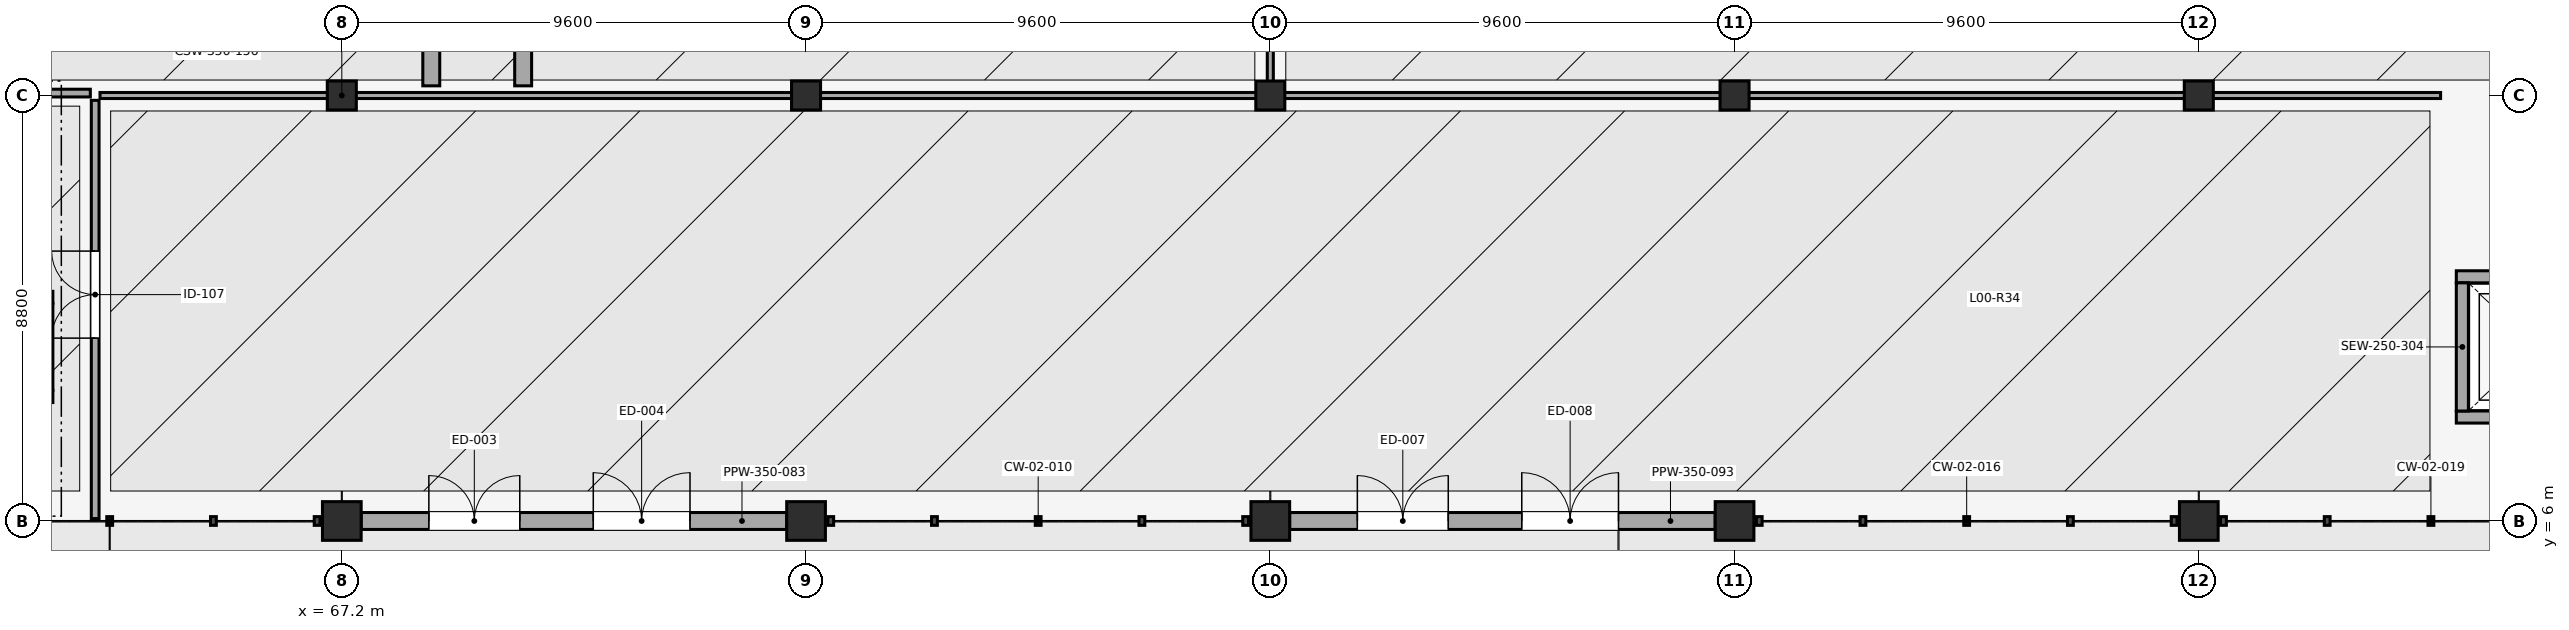
"""IFC4 building model, lengths in metres.
Left out: names, types, materials, properties, quantities, classifications, styles, units other than length and angle.
Written with IfcOpenShell. Run it as: python <this file> out.ifc"""

import sys

from ifc_helpers import new_model, si_unit, direction, frame, frame_2d, origin, origin_2d, place, context, subcontext, project, spatial, rectangle, extrude, element, fill, save


model = new_model("IFC4")
c1 = context("Model", 3, precision=1e-05, world=origin(), true_north=direction((0.0, 1.0)))
c2 = subcontext(c1, "Body", "Model", "MODEL_VIEW")
j1 = project(units=[si_unit("LENGTHUNIT", "METRE"), si_unit("PLANEANGLEUNIT", "RADIAN")], contexts=[c1])
p1 = place(None, origin())
s1 = spatial("IfcSite", under=j1, at=p1, CompositionType="ELEMENT")
p2 = place(p1, origin())
s2 = spatial("IfcBuilding", under=s1, at=p2, CompositionType="ELEMENT")
p3 = place(p2, origin())
s3 = spatial("IfcBuildingStorey", under=s2, at=p3, CompositionType="ELEMENT", Elevation=0.0)
p4 = place(p3, frame((67.2, 6.0, 0.0), z_axis=(0.0, 0.0, 1.0), x_axis=(1.0, 0.0, 0.0)))
e1 = element("IfcColumn", 1, at=p4, inside=s3, PredefinedType="COLUMN", context=c2, shape_type="SweptSolid", body=[
    extrude(rectangle(XDim=0.8, YDim=0.8, at=origin_2d()), origin(), (0.0, 0.0, 1.0), 4.8),
])
p5 = place(p3, frame((67.2, 14.8, 0.0), z_axis=(0.0, 0.0, 1.0), x_axis=(1.0, 0.0, 0.0)))
e2 = element("IfcColumn", 2, at=p5, inside=s3, PredefinedType="COLUMN", context=c2, shape_type="SweptSolid", body=[
    extrude(rectangle(XDim=0.6, YDim=0.6, at=origin_2d()), origin(), (0.0, 0.0, 1.0), 4.8),
])
p6 = place(p3, frame((76.8, 6.0, 0.0), z_axis=(0.0, 0.0, 1.0), x_axis=(1.0, 0.0, 0.0)))
e3 = element("IfcColumn", 3, at=p6, inside=s3, PredefinedType="COLUMN", context=c2, shape_type="SweptSolid", body=[
    extrude(rectangle(XDim=0.8, YDim=0.8, at=origin_2d()), origin(), (0.0, 0.0, 1.0), 4.8),
])
p7 = place(p3, frame((76.8, 14.8, 0.0), z_axis=(0.0, 0.0, 1.0), x_axis=(1.0, 0.0, 0.0)))
e4 = element("IfcColumn", 4, at=p7, inside=s3, PredefinedType="COLUMN", context=c2, shape_type="SweptSolid", body=[
    extrude(rectangle(XDim=0.6, YDim=0.6, at=origin_2d()), origin(), (0.0, 0.0, 1.0), 4.8),
])
p8 = place(p3, frame((86.4, 6.0, 0.0), z_axis=(0.0, 0.0, 1.0), x_axis=(1.0, 0.0, 0.0)))
e5 = element("IfcColumn", 5, at=p8, inside=s3, PredefinedType="COLUMN", context=c2, shape_type="SweptSolid", body=[
    extrude(rectangle(XDim=0.8, YDim=0.8, at=origin_2d()), origin(), (0.0, 0.0, 1.0), 4.8),
])
p9 = place(p3, frame((86.4, 14.8, 0.0), z_axis=(0.0, 0.0, 1.0), x_axis=(1.0, 0.0, 0.0)))
e6 = element("IfcColumn", 6, at=p9, inside=s3, PredefinedType="COLUMN", context=c2, shape_type="SweptSolid", body=[
    extrude(rectangle(XDim=0.6, YDim=0.6, at=origin_2d()), origin(), (0.0, 0.0, 1.0), 4.8),
])
p10 = place(p3, frame((96.0, 6.0, 0.0), z_axis=(0.0, 0.0, 1.0), x_axis=(1.0, 0.0, 0.0)))
e7 = element("IfcColumn", 7, at=p10, inside=s3, PredefinedType="COLUMN", context=c2, shape_type="SweptSolid", body=[
    extrude(rectangle(XDim=0.8, YDim=0.8, at=origin_2d()), origin(), (0.0, 0.0, 1.0), 4.8),
])
p11 = place(p3, frame((96.0, 14.8, 0.0), z_axis=(0.0, 0.0, 1.0), x_axis=(1.0, 0.0, 0.0)))
e8 = element("IfcColumn", 8, at=p11, inside=s3, PredefinedType="COLUMN", context=c2, shape_type="SweptSolid", body=[
    extrude(rectangle(XDim=0.6, YDim=0.6, at=origin_2d()), origin(), (0.0, 0.0, 1.0), 4.8),
])
p12 = place(p3, frame((105.6, 6.0, 0.0), z_axis=(0.0, 0.0, 1.0), x_axis=(1.0, 0.0, 0.0)))
e9 = element("IfcColumn", 9, at=p12, inside=s3, PredefinedType="COLUMN", context=c2, shape_type="SweptSolid", body=[
    extrude(rectangle(XDim=0.8, YDim=0.8, at=origin_2d()), origin(), (0.0, 0.0, 1.0), 4.8),
])
p13 = place(p3, frame((105.6, 14.8, 0.0), z_axis=(0.0, 0.0, 1.0), x_axis=(1.0, 0.0, 0.0)))
e10 = element("IfcColumn", 10, at=p13, inside=s3, PredefinedType="COLUMN", context=c2, shape_type="SweptSolid", body=[
    extrude(rectangle(XDim=0.6, YDim=0.6, at=origin_2d()), origin(), (0.0, 0.0, 1.0), 4.8),
])
p14 = place(p3, frame((67.6, 6.0, 0.0), z_axis=(0.0, 0.0, 1.0), x_axis=(1.0, 0.0, 0.0)))
e11 = element("IfcWall", 11, at=p14, inside=s3, PredefinedType="SOLIDWALL", context=c2, shape_type="SweptSolid", body=[
    extrude(rectangle(XDim=8.8, YDim=0.35, at=frame_2d((4.4, 0.0))), origin(), (0.0, 0.0, 1.0), 4.1),
])
p15 = place(p14, frame((1.4, 0.0, 0.0)))
e12 = element("IfcOpeningElement", 12, at=p15, cuts=e11, PredefinedType="OPENING", context=c2, shape_type="SweptSolid", body=[
    extrude(rectangle(XDim=1.88, YDim=2.31, at=frame_2d((0.94, 1.155))), frame((0.0, 0.185, 0.0), z_axis=(0.0, -1.0, 0.0), x_axis=(1.0, 0.0, 0.0)), (0.0, 0.0, 1.0), 0.37),
])
p16 = place(p14, frame((4.8, 0.0, 0.0)))
e13 = element("IfcOpeningElement", 13, at=p16, cuts=e11, PredefinedType="OPENING", context=c2, shape_type="SweptSolid", body=[
    extrude(rectangle(XDim=2.0, YDim=2.4, at=frame_2d((1.0, 1.2))), frame((0.0, 0.185, 0.0), z_axis=(0.0, -1.0, 0.0), x_axis=(1.0, 0.0, 0.0)), (0.0, 0.0, 1.0), 0.37),
])
p17 = place(p3, frame((86.8, 6.0, 0.0), z_axis=(0.0, 0.0, 1.0), x_axis=(1.0, 0.0, 0.0)))
e14 = element("IfcWall", 14, at=p17, inside=s3, PredefinedType="SOLIDWALL", context=c2, shape_type="SweptSolid", body=[
    extrude(rectangle(XDim=8.8, YDim=0.35, at=frame_2d((4.4, 0.0))), origin(), (0.0, 0.0, 1.0), 4.1),
])
p18 = place(p17, frame((1.4, 0.0, 0.0)))
e15 = element("IfcOpeningElement", 15, at=p18, cuts=e14, PredefinedType="OPENING", context=c2, shape_type="SweptSolid", body=[
    extrude(rectangle(XDim=1.88, YDim=2.31, at=frame_2d((0.94, 1.155))), frame((0.0, 0.185, 0.0), z_axis=(0.0, -1.0, 0.0), x_axis=(1.0, 0.0, 0.0)), (0.0, 0.0, 1.0), 0.37),
])
p19 = place(p17, frame((4.8, 0.0, 0.0)))
e16 = element("IfcOpeningElement", 16, at=p19, cuts=e14, PredefinedType="OPENING", context=c2, shape_type="SweptSolid", body=[
    extrude(rectangle(XDim=2.0, YDim=2.4, at=frame_2d((1.0, 1.2))), frame((0.0, 0.185, 0.0), z_axis=(0.0, -1.0, 0.0), x_axis=(1.0, 0.0, 0.0)), (0.0, 0.0, 1.0), 0.37),
])
for number, where, z_axis, x_axis in (
    (17, (69.05, 15.0, 0.0), (0.0, 0.0, 1.0), (0.0, 1.0, 0.0)),
    (18, (70.95, 15.0, 0.0), (0.0, 0.0, 1.0), (0.0, 1.0, 0.0)),
):
    element("IfcWall", number, at=place(p3, frame(where, z_axis=z_axis, x_axis=x_axis)), inside=s3, PredefinedType="SHEAR", context=c2, shape_type="SweptSolid", body=[
        extrude(rectangle(XDim=3.3, YDim=0.35, at=frame_2d((1.65, 0.0))), origin(), (0.0, 0.0, 1.0), 4.55),
    ])
p20 = place(p3, frame((61.225, 8.575, 0.0), z_axis=(0.0, 0.0, 1.0), x_axis=(-1.0, 0.0, 0.0)))
e19 = element("IfcWall", 19, at=p20, inside=s3, PredefinedType="SOLIDWALL", context=c2, shape_type="SweptSolid", body=[
    extrude(rectangle(XDim=2.85, YDim=0.25, at=frame_2d((1.425, 0.0))), origin(), (0.0, 0.0, 1.0), 4.55),
])
p21 = place(p3, frame((58.375, 10.625, 0.0), z_axis=(0.0, 0.0, 1.0), x_axis=(1.0, 0.0, 0.0)))
e20 = element("IfcWall", 20, at=p21, inside=s3, PredefinedType="SOLIDWALL", context=c2, shape_type="SweptSolid", body=[
    extrude(rectangle(XDim=2.85, YDim=0.25, at=frame_2d((1.425, 0.0))), origin(), (0.0, 0.0, 1.0), 4.55),
])
p22 = place(p21, frame((0.875, 0.0, 0.0)))
e21 = element("IfcOpeningElement", 21, at=p22, cuts=e20, PredefinedType="OPENING", context=c2, shape_type="SweptSolid", body=[
    extrude(rectangle(XDim=1.1, YDim=2.15, at=frame_2d((0.55, 1.075))), frame((0.0, 0.135, 0.0), z_axis=(0.0, -1.0, 0.0), x_axis=(1.0, 0.0, 0.0)), (0.0, 0.0, 1.0), 0.27),
])
p23 = place(p3, frame((61.1, 10.5, 0.0), z_axis=(0.0, 0.0, 1.0), x_axis=(0.0, -1.0, 0.0)))
e22 = element("IfcWall", 22, at=p23, inside=s3, PredefinedType="SOLIDWALL", context=c2, shape_type="SweptSolid", body=[
    extrude(rectangle(XDim=1.8, YDim=0.25, at=frame_2d((0.9, 0.0))), origin(), (0.0, 0.0, 1.0), 4.55),
])
p24 = place(p3, frame((114.275, 8.15, 0.0), z_axis=(0.0, 0.0, 1.0), x_axis=(-1.0, 0.0, 0.0)))
e23 = element("IfcWall", 23, at=p24, inside=s3, PredefinedType="SOLIDWALL", context=c2, shape_type="SweptSolid", body=[
    extrude(rectangle(XDim=3.35, YDim=0.25, at=frame_2d((1.675, 0.0))), origin(), (0.0, 0.0, 1.0), 4.55),
])
p25 = place(p3, frame((110.925, 11.05, 0.0), z_axis=(0.0, 0.0, 1.0), x_axis=(1.0, 0.0, 0.0)))
e24 = element("IfcWall", 24, at=p25, inside=s3, PredefinedType="SOLIDWALL", context=c2, shape_type="SweptSolid", body=[
    extrude(rectangle(XDim=3.35, YDim=0.25, at=frame_2d((1.675, 0.0))), origin(), (0.0, 0.0, 1.0), 4.55),
])
p26 = place(p25, frame((0.775, 0.0, 0.0)))
e25 = element("IfcOpeningElement", 25, at=p26, cuts=e24, PredefinedType="OPENING", context=c2, shape_type="SweptSolid", body=[
    extrude(rectangle(XDim=1.8, YDim=2.3, at=frame_2d((0.9, 1.15))), frame((0.0, 0.135, 0.0), z_axis=(0.0, -1.0, 0.0), x_axis=(1.0, 0.0, 0.0)), (0.0, 0.0, 1.0), 0.27),
])
p27 = place(p3, frame((111.05, 8.275, 0.0), z_axis=(0.0, 0.0, 1.0), x_axis=(0.0, 1.0, 0.0)))
e26 = element("IfcWall", 26, at=p27, inside=s3, PredefinedType="SOLIDWALL", context=c2, shape_type="SweptSolid", body=[
    extrude(rectangle(XDim=2.65, YDim=0.25, at=frame_2d((1.325, 0.0))), origin(), (0.0, 0.0, 1.0), 4.55),
])
p28 = place(p3, frame((86.4, 14.9, 0.0), z_axis=(0.0, 0.0, 1.0), x_axis=(0.0, 1.0, 0.0)))
e27 = element("IfcWall", 27, at=p28, inside=s3, PredefinedType="PARTITIONING", context=c2, shape_type="SweptSolid", body=[
    extrude(rectangle(XDim=17.4, YDim=0.125, at=frame_2d((8.7, 0.0))), origin(), (0.0, 0.0, 1.0), 4.42),
])
p29 = place(p3, frame((62.2, 14.8, 0.0), z_axis=(0.0, 0.0, 1.0), x_axis=(1.0, 0.0, 0.0)))
e28 = element("IfcWall", 28, at=p29, inside=s3, PredefinedType="PARTITIONING", context=c2, shape_type="SweptSolid", body=[
    extrude(rectangle(XDim=24.1, YDim=0.125, at=frame_2d((12.05, 0.0))), origin(), (0.0, 0.0, 1.0), 3.925),
])
p30 = place(p3, frame((57.7, 14.85, 0.0), z_axis=(0.0, 0.0, 1.0), x_axis=(1.0, 0.0, 0.0)))
e29 = element("IfcWall", 29, at=p30, inside=s3, PredefinedType="PARTITIONING", context=c2, shape_type="SweptSolid", body=[
    extrude(rectangle(XDim=4.3, YDim=0.16, at=frame_2d((2.15, 0.0))), origin(), (0.0, 0.0, 1.0), 3.925),
])
p31 = place(p30, frame((1.25, 0.0, 0.0)))
e30 = element("IfcOpeningElement", 30, at=p31, cuts=e29, PredefinedType="OPENING", context=c2, shape_type="SweptSolid", body=[
    extrude(rectangle(XDim=1.8, YDim=2.15, at=frame_2d((0.9, 1.075))), frame((0.0, 0.09, 0.0), z_axis=(0.0, -1.0, 0.0), x_axis=(1.0, 0.0, 0.0)), (0.0, 0.0, 1.0), 0.18),
])
p32 = place(p3, frame((86.5, 14.8, 0.0), z_axis=(0.0, 0.0, 1.0), x_axis=(1.0, 0.0, 0.0)))
e31 = element("IfcWall", 31, at=p32, inside=s3, PredefinedType="PARTITIONING", context=c2, shape_type="SweptSolid", body=[
    extrude(rectangle(XDim=24.1, YDim=0.125, at=frame_2d((12.05, 0.0))), origin(), (0.0, 0.0, 1.0), 3.925),
])
p33 = place(p3, frame((62.1, 6.05, 0.0), z_axis=(0.0, 0.0, 1.0), x_axis=(0.0, 1.0, 0.0)))
e32 = element("IfcWall", 32, at=p33, inside=s3, PredefinedType="PARTITIONING", context=c2, shape_type="SweptSolid", body=[
    extrude(rectangle(XDim=8.65, YDim=0.16, at=frame_2d((4.325, 0.0))), origin(), (0.0, 0.0, 1.0), 4.42),
])
p34 = place(p33, frame((3.732, 0.0, 0.0)))
e33 = element("IfcOpeningElement", 33, at=p34, cuts=e32, PredefinedType="OPENING", context=c2, shape_type="SweptSolid", body=[
    extrude(rectangle(XDim=1.8, YDim=2.15, at=frame_2d((0.9, 1.075))), frame((0.0, 0.09, 0.0), z_axis=(0.0, -1.0, 0.0), x_axis=(1.0, 0.0, 0.0)), (0.0, 0.0, 1.0), 0.18),
])
p35 = place(p15, origin())
e34 = element("IfcDoor", 34, at=p35, inside=s3, OperationType="DOUBLE_DOOR_SINGLE_SWING", PredefinedType="DOOR", context=c2, shape_type="SweptSolid", body=[
    extrude(rectangle(XDim=1.88, YDim=2.31, at=frame_2d((0.94, 1.155))), frame((0.0, 0.025, 0.0), z_axis=(0.0, -1.0, 0.0), x_axis=(1.0, 0.0, 0.0)), (0.0, 0.0, 1.0), 0.05),
])
fill(e12, e34)
p36 = place(p16, origin())
e35 = element("IfcDoor", 35, at=p36, inside=s3, OperationType="DOUBLE_DOOR_SINGLE_SWING", PredefinedType="DOOR", context=c2, shape_type="SweptSolid", body=[
    extrude(rectangle(XDim=2.0, YDim=2.4, at=frame_2d((1.0, 1.2))), frame((0.0, 0.025, 0.0), z_axis=(0.0, -1.0, 0.0), x_axis=(1.0, 0.0, 0.0)), (0.0, 0.0, 1.0), 0.05),
])
fill(e13, e35)
p37 = place(p18, origin())
e36 = element("IfcDoor", 36, at=p37, inside=s3, OperationType="DOUBLE_DOOR_SINGLE_SWING", PredefinedType="DOOR", context=c2, shape_type="SweptSolid", body=[
    extrude(rectangle(XDim=1.88, YDim=2.31, at=frame_2d((0.94, 1.155))), frame((0.0, 0.025, 0.0), z_axis=(0.0, -1.0, 0.0), x_axis=(1.0, 0.0, 0.0)), (0.0, 0.0, 1.0), 0.05),
])
fill(e15, e36)
p38 = place(p19, origin())
e37 = element("IfcDoor", 37, at=p38, inside=s3, OperationType="DOUBLE_DOOR_SINGLE_SWING", PredefinedType="DOOR", context=c2, shape_type="SweptSolid", body=[
    extrude(rectangle(XDim=2.0, YDim=2.4, at=frame_2d((1.0, 1.2))), frame((0.0, 0.025, 0.0), z_axis=(0.0, -1.0, 0.0), x_axis=(1.0, 0.0, 0.0)), (0.0, 0.0, 1.0), 0.05),
])
fill(e16, e37)
p39 = place(p34, origin())
e38 = element("IfcDoor", 38, at=p39, inside=s3, OperationType="DOUBLE_DOOR_SINGLE_SWING", PredefinedType="DOOR", context=c2, shape_type="SweptSolid", body=[
    extrude(rectangle(XDim=1.8, YDim=2.15, at=frame_2d((0.9, 1.075))), frame((0.0, 0.025, 0.0), z_axis=(0.0, -1.0, 0.0), x_axis=(1.0, 0.0, 0.0)), (0.0, 0.0, 1.0), 0.05),
])
fill(e33, e38)
save(model, sys.argv[1])
